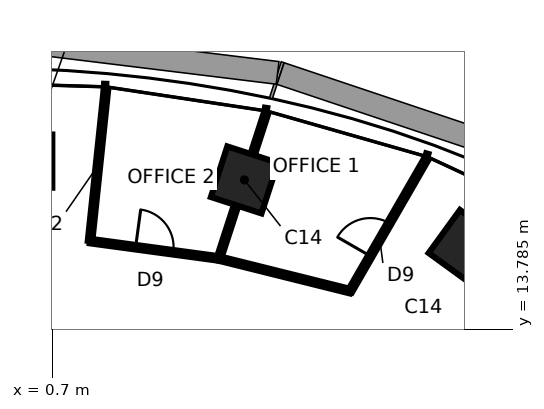
"""IFC4 building model, lengths in metres.
Left out: names, types, materials, properties, quantities, classifications, styles, units other than length and angle.
Written with IfcOpenShell. Run it as: python <this file> out.ifc"""

import sys

from ifc_helpers import new_model, si_unit, direction, frame, frame_2d, origin, origin_2d, place, context, subcontext, project, spatial, rectangle, extrude, element, fill, save


model = new_model("IFC4")
c1 = context("Model", 3, precision=1e-05, world=origin(), true_north=direction((0.0, 1.0)))
c2 = subcontext(c1, "Body", "Model", "MODEL_VIEW")
j1 = project(units=[si_unit("LENGTHUNIT", "METRE"), si_unit("PLANEANGLEUNIT", "RADIAN")], contexts=[c1])
p1 = place(None, origin())
s1 = spatial("IfcSite", under=j1, at=p1, CompositionType="ELEMENT")
p2 = place(p1, origin())
s2 = spatial("IfcBuilding", under=s1, at=p2, CompositionType="ELEMENT")
p3 = place(p2, frame((0.0, 0.0, 187.7)))
s3 = spatial("IfcBuildingStorey", under=s2, at=p3, CompositionType="ELEMENT", Elevation=187.7)
for number, where, z_axis, x_axis in (
    (1, (11.581, 15.94, 0.0), (0.0, 0.0, 1.0), (0.588, 0.809, 0.0)),
    (2, (5.754, 17.708, 0.0), (0.0, 0.0, 1.0), (0.309, 0.951, 0.0)),
    (3, (0.0, 18.204, 0.0), (0.0, 0.0, 1.0), (0.0, 1.0, 0.0)),
):
    element("IfcColumn", number, at=place(p3, frame(where, z_axis=z_axis, x_axis=x_axis)), inside=s3, PredefinedType="COLUMN", context=c2, shape_type="SweptSolid", body=[
        extrude(rectangle(XDim=1.4, YDim=1.4, at=origin_2d()), origin(), (0.0, 0.0, 1.0), 3.9),
    ])
p4 = place(p3, frame((8.534, 14.782, 0.0), z_axis=(0.0, 0.0, 1.0), x_axis=(0.49999894854, 0.866026010844, 0.0)))
e4 = element("IfcWall", 4, at=p4, inside=s3, PredefinedType="PARTITIONING", context=c2, shape_type="SweptSolid", body=[
    extrude(rectangle(XDim=4.0, YDim=0.12, at=frame_2d((2.0, 0.0))), origin(), (0.0, 0.0, 1.0), 3.74),
])
p5 = place(p4, frame((1.066, 0.0, 0.0)))
e5 = element("IfcOpeningElement", 5, at=p5, cuts=e4, PredefinedType="OPENING", context=c2, shape_type="SweptSolid", body=[
    extrude(rectangle(XDim=1.0, YDim=2.4, at=frame_2d((0.5, 1.2))), frame((0.0, 0.07, 0.0), z_axis=(0.0, -1.0, 0.0), x_axis=(1.0, 0.0, 0.0)), (0.0, 0.0, 1.0), 0.14),
])
p6 = place(p3, frame((5.082, 15.641, 0.0), z_axis=(0.0, 0.0, 1.0), x_axis=(0.970364132875, -0.241647366281, 0.0)))
e6 = element("IfcWall", 6, at=p6, inside=s3, PredefinedType="PARTITIONING", context=c2, shape_type="SweptSolid", body=[
    extrude(rectangle(XDim=3.557, YDim=0.12, at=frame_2d((1.779, 0.0))), origin(), (0.0, 0.0, 1.0), 3.74),
])
p7 = place(p3, frame((5.082, 15.641, 0.0), z_axis=(0.0, 0.0, 1.0), x_axis=(0.309022586479, 0.951054699292, 0.0)))
e7 = element("IfcWall", 7, at=p7, inside=s3, PredefinedType="PARTITIONING", context=c2, shape_type="SweptSolid", body=[
    extrude(rectangle(XDim=4.0, YDim=0.12, at=frame_2d((2.0, 0.0))), origin(), (0.0, 0.0, 1.0), 3.04),
])
p8 = place(p3, frame((1.692, 16.1, 0.0), z_axis=(0.0, 0.0, 1.0), x_axis=(0.990987566224, -0.133953886058, 0.0)))
e8 = element("IfcWall", 8, at=p8, inside=s3, PredefinedType="PARTITIONING", context=c2, shape_type="SweptSolid", body=[
    extrude(rectangle(XDim=3.421, YDim=0.12, at=frame_2d((1.71, 0.0))), origin(), (0.0, 0.0, 1.0), 3.74),
])
p9 = place(p8, frame((1.21, 0.0, 0.0)))
e9 = element("IfcOpeningElement", 9, at=p9, cuts=e8, PredefinedType="OPENING", context=c2, shape_type="SweptSolid", body=[
    extrude(rectangle(XDim=1.0, YDim=2.4, at=frame_2d((0.5, 1.2))), frame((0.0, 0.07, 0.0), z_axis=(0.0, -1.0, 0.0), x_axis=(1.0, 0.0, 0.0)), (0.0, 0.0, 1.0), 0.14),
])
p10 = place(p3, frame((2.11, 20.078, 0.0), z_axis=(0.0, 0.0, 1.0), x_axis=(-0.104548171712, -0.99451982373, 0.0)))
e10 = element("IfcWall", 10, at=p10, inside=s3, PredefinedType="PARTITIONING", context=c2, shape_type="SweptSolid", body=[
    extrude(rectangle(XDim=4.0, YDim=0.12, at=frame_2d((2.0, 0.0))), origin(), (0.0, 0.0, 1.0), 3.74),
])
p11 = place(p5, origin())
e11 = element("IfcDoor", 11, at=p11, inside=s3, OperationType="SINGLE_SWING_LEFT", PredefinedType="DOOR", context=c2, shape_type="SweptSolid", body=[
    extrude(rectangle(XDim=1.0, YDim=2.4, at=frame_2d((0.5, 1.2))), frame((0.0, 0.025, 0.0), z_axis=(0.0, -1.0, 0.0), x_axis=(1.0, 0.0, 0.0)), (0.0, 0.0, 1.0), 0.05),
])
fill(e5, e11)
p12 = place(p9, origin())
e12 = element("IfcDoor", 12, at=p12, inside=s3, OperationType="SINGLE_SWING_LEFT", PredefinedType="DOOR", context=c2, shape_type="SweptSolid", body=[
    extrude(rectangle(XDim=1.0, YDim=2.4, at=frame_2d((0.5, 1.2))), frame((0.0, 0.025, 0.0), z_axis=(0.0, -1.0, 0.0), x_axis=(1.0, 0.0, 0.0)), (0.0, 0.0, 1.0), 0.05),
])
fill(e9, e12)
save(model, sys.argv[1])
